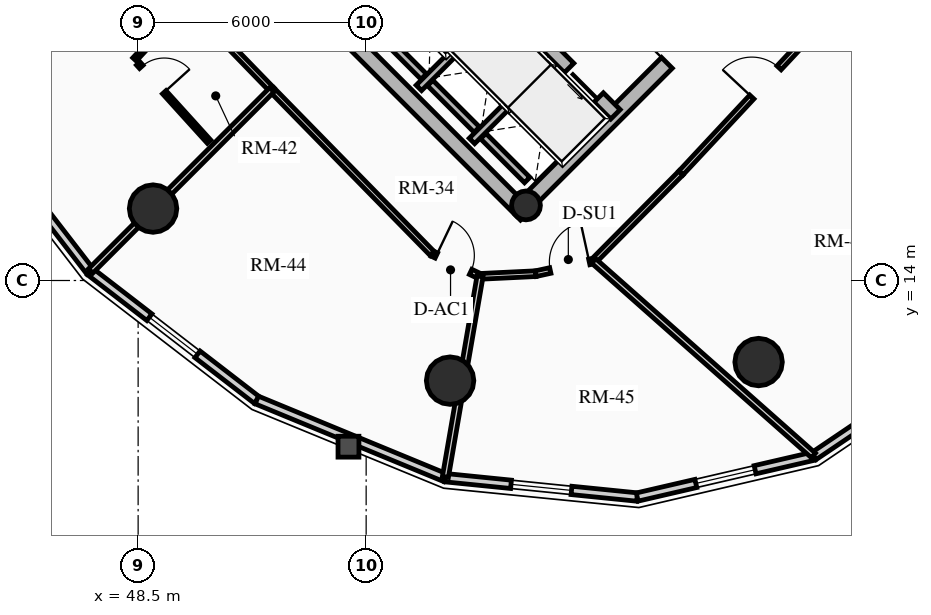
"""IFC4 building model, lengths in metres.
Left out: names, types, materials, properties, quantities, classifications, styles, units other than length and angle.
Written with IfcOpenShell. Run it as: python <this file> out.ifc"""

import sys

from ifc_helpers import new_model, si_unit, direction, frame, frame_2d, origin, origin_2d, place, context, subcontext, project, spatial, rectangle, circle, hollow_circle, extrude, source, transform, mapped, element, fill, save


model = new_model("IFC4")
c1 = context("Model", 3, precision=1e-05, world=origin(), true_north=direction((0.0, 1.0)))
c2 = subcontext(c1, "Body", "Model", "MODEL_VIEW")
j1 = project(units=[si_unit("LENGTHUNIT", "METRE"), si_unit("PLANEANGLEUNIT", "RADIAN")], contexts=[c1])
p1 = place(None, origin())
s1 = spatial("IfcSite", under=j1, at=p1, CompositionType="ELEMENT")
p2 = place(p1, origin())
s2 = spatial("IfcBuilding", under=s1, at=p2, CompositionType="ELEMENT")
p3 = place(p2, frame((0.0, 0.0, 154.51)))
s3 = spatial("IfcBuildingStorey", under=s2, at=p3, CompositionType="ELEMENT", Elevation=154.51)
p4 = place(p3, frame((58.702, 15.732, 0.0), z_axis=(0.0, 0.0, 1.0), x_axis=(-0.707106781187, 0.707106781187, 0.0)))
e1 = element("IfcWall", 1, at=p4, inside=s3, PredefinedType="SHEAR", context=c2, shape_type="SweptSolid", body=[
    extrude(rectangle(XDim=14.1, YDim=0.4, at=frame_2d((7.05, 0.0))), origin(), (0.0, 0.0, 1.0), 2.91),
])
p5 = place(p3, frame((58.561, 15.873, 0.0), z_axis=(0.0, 0.0, 1.0), x_axis=(0.707106781187, 0.707106781187, 0.0)))
e2 = element("IfcWall", 2, at=p5, inside=s3, PredefinedType="SHEAR", context=c2, shape_type="SweptSolid", body=[
    extrude(rectangle(XDim=10.7, YDim=0.4, at=frame_2d((5.35, 0.0))), origin(), (0.0, 0.0, 1.0), 2.91),
])
m1 = source(origin(), c2, "Body", "SweptSolid", [
    extrude(rectangle(XDim=1.5, YDim=2.02, at=frame_2d((0.75, 1.01))), frame((0.0, 0.21, 0.0), z_axis=(0.0, -1.0, 0.0), x_axis=(1.0, 0.0, 0.0)), (0.0, 0.0, 1.0), 0.42),
])
p6 = place(p5, frame((5.45, 0.0, 0.0)))
e3 = element("IfcOpeningElement", 3, at=p6, cuts=e2, PredefinedType="OPENING", context=c2, shape_type="MappedRepresentation", body=[
    mapped(m1, transform((0.0, 0.0, 0.0), x_axis=(1.0, 0.0, 0.0), y_axis=(0.0, 1.0, 0.0), z_axis=(0.0, 0.0, 1.0), scale=1.0)),
])
p7 = place(p3, frame((61.06, 18.373, 0.0), z_axis=(0.0, 0.0, 1.0), x_axis=(-0.707106781187, 0.707106781187, 0.0)))
e4 = element("IfcWall", 4, at=p7, inside=s3, PredefinedType="SHEAR", context=c2, shape_type="SweptSolid", body=[
    extrude(rectangle(XDim=13.7, YDim=0.35, at=frame_2d((6.85, 0.0))), origin(), (0.0, 0.0, 1.0), 2.91),
])
m2 = source(origin(), c2, "Body", "SweptSolid", [
    extrude(rectangle(XDim=1.1, YDim=2.015, at=frame_2d((0.55, 1.007))), frame((0.0, 0.185, 0.0), z_axis=(0.0, -1.0, 0.0), x_axis=(1.0, 0.0, 0.0)), (0.0, 0.0, 1.0), 0.37),
])
p8 = place(p7, frame((4.85, 0.0, 0.0)))
e5 = element("IfcOpeningElement", 5, at=p8, cuts=e4, PredefinedType="OPENING", context=c2, shape_type="MappedRepresentation", body=[
    mapped(m2, transform((0.0, 0.0, 0.0), x_axis=(1.0, 0.0, 0.0), y_axis=(0.0, 1.0, 0.0), z_axis=(0.0, 0.0, 1.0), scale=1.0)),
])
p9 = place(p7, frame((0.625, 0.0, 0.0)))
e6 = element("IfcOpeningElement", 6, at=p9, cuts=e4, PredefinedType="OPENING", context=c2, shape_type="MappedRepresentation", body=[
    mapped(m2, transform((0.0, 0.0, 0.0), x_axis=(1.0, 0.0, 0.0), y_axis=(0.0, 1.0, 0.0), z_axis=(0.0, 0.0, 1.0), scale=1.0)),
])
p10 = place(p7, frame((2.625, 0.0, 0.0)))
e7 = element("IfcOpeningElement", 7, at=p10, cuts=e4, PredefinedType="OPENING", context=c2, shape_type="MappedRepresentation", body=[
    mapped(m2, transform((0.0, 0.0, 0.0), x_axis=(1.0, 0.0, 0.0), y_axis=(0.0, 1.0, 0.0), z_axis=(0.0, 0.0, 1.0), scale=1.0)),
])
m3 = source(origin(), c2, "Body", "SweptSolid", [
    extrude(rectangle(XDim=1.15, YDim=2.02, at=frame_2d((0.575, 1.01))), frame((0.0, 0.185, 0.0), z_axis=(0.0, -1.0, 0.0), x_axis=(1.0, 0.0, 0.0)), (0.0, 0.0, 1.0), 0.37),
])
p11 = place(p7, frame((7.27, 0.0, 0.0)))
e8 = element("IfcOpeningElement", 8, at=p11, cuts=e4, PredefinedType="OPENING", context=c2, shape_type="MappedRepresentation", body=[
    mapped(m3, transform((0.0, 0.0, 0.0), x_axis=(1.0, 0.0, 0.0), y_axis=(0.0, 1.0, 0.0), z_axis=(0.0, 0.0, 1.0), scale=1.0)),
])
p12 = place(p3, frame((58.706, 15.976, 0.0), z_axis=(0.0, 0.0, 1.0), x_axis=(0.707106781187, 0.707106781187, 0.0)))
e9 = element("IfcColumn", 9, at=p12, inside=s3, PredefinedType="COLUMN", context=c2, shape_type="SweptSolid", body=[
    extrude(hollow_circle(Radius=0.38, WallThickness=0.032, at=origin_2d()), origin(), (0.0, 0.0, 1.0), 2.91),
])
for number, where, z_axis, x_axis in (
    (10, (48.893, 15.893, 0.0), (0.0, 0.0, 1.0), (1.0, 0.0, 0.0)),
    (11, (56.709, 11.365, 0.0), (0.0, 0.0, 1.0), (1.0, 0.0, 0.0)),
    (12, (64.827, 11.854, 0.0), (0.0, 0.0, 1.0), (1.0, 0.0, 0.0)),
):
    element("IfcColumn", number, at=place(p3, frame(where, z_axis=z_axis, x_axis=x_axis)), inside=s3, PredefinedType="USERDEFINED", context=c2, shape_type="SweptSolid", body=[
        extrude(circle(Radius=0.625, at=origin_2d()), origin(), (0.0, 0.0, 1.0), 2.91),
    ])
p13 = place(p3, frame((47.236, 14.236, 0.0), z_axis=(0.0, 0.0, 1.0), x_axis=(-0.610543584779, 0.791982658323, 0.0)))
e13 = element("IfcWall", 13, at=p13, inside=s3, PredefinedType="SOLIDWALL", context=c2, shape_type="SweptSolid", body=[
    extrude(rectangle(XDim=5.537, YDim=0.22, at=frame_2d((2.769, 0.0))), origin(), (0.0, 0.0, 1.0), 2.245),
])
p14 = place(p3, frame((51.622, 10.856, 0.0), z_axis=(0.0, 0.0, 1.0), x_axis=(-0.791982658323, 0.610543584779, 0.0)))
e14 = element("IfcWall", 14, at=p14, inside=s3, PredefinedType="SOLIDWALL", context=c2, shape_type="SweptSolid", body=[
    extrude(rectangle(XDim=5.537, YDim=0.22, at=frame_2d((2.769, 0.0))), origin(), (0.0, 0.0, 1.0), 2.245),
])
m4 = source(origin(), c2, "Body", "SweptSolid", [
    extrude(rectangle(XDim=1.6, YDim=1.3, at=frame_2d((0.8, 0.65))), frame((0.0, 0.12, 0.0), z_axis=(0.0, -1.0, 0.0), x_axis=(1.0, 0.0, 0.0)), (0.0, 0.0, 1.0), 0.24),
])
p15 = place(p14, frame((1.968, 0.0, 0.65)))
e15 = element("IfcOpeningElement", 15, at=p15, cuts=e14, PredefinedType="OPENING", context=c2, shape_type="MappedRepresentation", body=[
    mapped(m4, transform((0.0, 0.0, 0.0), x_axis=(1.0, 0.0, 0.0), y_axis=(0.0, 1.0, 0.0), z_axis=(0.0, 0.0, 1.0), scale=1.0)),
])
p16 = place(p3, frame((56.582, 8.811, 0.0), z_axis=(0.0, 0.0, 1.0), x_axis=(-0.924528197738, 0.38111364655, 0.0)))
e16 = element("IfcWall", 16, at=p16, inside=s3, PredefinedType="SOLIDWALL", context=c2, shape_type="SweptSolid", body=[
    extrude(rectangle(XDim=5.366, YDim=0.22, at=frame_2d((2.683, 0.0))), origin(), (0.0, 0.0, 1.0), 2.245),
])
p17 = place(p3, frame((61.633, 8.302, 0.0), z_axis=(0.0, 0.0, 1.0), x_axis=(-0.994959267396, 0.100279889424, 0.0)))
e17 = element("IfcWall", 17, at=p17, inside=s3, PredefinedType="SOLIDWALL", context=c2, shape_type="SweptSolid", body=[
    extrude(rectangle(XDim=5.076, YDim=0.22, at=frame_2d((2.538, 0.0))), origin(), (0.0, 0.0, 1.0), 2.245),
])
p18 = place(p17, frame((1.738, 0.0, 0.65)))
e18 = element("IfcOpeningElement", 18, at=p18, cuts=e17, PredefinedType="OPENING", context=c2, shape_type="MappedRepresentation", body=[
    mapped(m4, transform((0.0, 0.0, 0.0), x_axis=(1.0, 0.0, 0.0), y_axis=(0.0, 1.0, 0.0), z_axis=(0.0, 0.0, 1.0), scale=1.0)),
])
p19 = place(p3, frame((66.279, 9.378, 0.0), z_axis=(0.0, 0.0, 1.0), x_axis=(-0.974206226622, -0.225659540039, 0.0)))
e19 = element("IfcWall", 19, at=p19, inside=s3, PredefinedType="SOLIDWALL", context=c2, shape_type="SweptSolid", body=[
    extrude(rectangle(XDim=4.769, YDim=0.22, at=frame_2d((2.385, 0.0))), origin(), (0.0, 0.0, 1.0), 2.245),
])
p20 = place(p19, frame((1.585, 0.0, 0.65)))
e20 = element("IfcOpeningElement", 20, at=p20, cuts=e19, PredefinedType="OPENING", context=c2, shape_type="MappedRepresentation", body=[
    mapped(m4, transform((0.0, 0.0, 0.0), x_axis=(1.0, 0.0, 0.0), y_axis=(0.0, 1.0, 0.0), z_axis=(0.0, 0.0, 1.0), scale=1.0)),
])
p21 = place(p3, frame((70.065, 11.935, 0.0), z_axis=(0.0, 0.0, 1.0), x_axis=(-0.828739009952, -0.559635286042, 0.0)))
e21 = element("IfcWall", 21, at=p21, inside=s3, PredefinedType="SOLIDWALL", context=c2, shape_type="SweptSolid", body=[
    extrude(rectangle(XDim=4.569, YDim=0.22, at=frame_2d((2.284, 0.0))), origin(), (0.0, 0.0, 1.0), 2.245),
])
p22 = place(p3, frame((55.888, 19.069, 0.0), z_axis=(0.0, 0.0, 1.0), x_axis=(0.707106781187, 0.707106781187, 0.0)))
e22 = element("IfcWall", 22, at=p22, inside=s3, PredefinedType="SHEAR", context=c2, shape_type="SweptSolid", body=[
    extrude(rectangle(XDim=2.97, YDim=0.2, at=frame_2d((1.485, 0.0))), origin(), (0.0, 0.0, 1.0), 2.91),
])
p23 = place(p3, frame((56.015, 19.366, 0.0), z_axis=(0.0, 0.0, 1.0), x_axis=(-0.707106781187, 0.707106781187, 0.0)))
e23 = element("IfcWall", 23, at=p23, inside=s3, PredefinedType="SHEAR", context=c2, shape_type="SweptSolid", body=[
    extrude(rectangle(XDim=2.44, YDim=0.2, at=frame_2d((1.22, 0.0))), origin(), (0.0, 0.0, 1.0), 2.91),
])
p24 = place(p3, frame((57.284, 17.673, 0.0), z_axis=(0.0, 0.0, 1.0), x_axis=(0.707147878904, 0.70706568108, 0.0)))
e24 = element("IfcWall", 24, at=p24, inside=s3, PredefinedType="SHEAR", context=c2, shape_type="SweptSolid", body=[
    extrude(rectangle(XDim=2.97, YDim=0.2, at=frame_2d((1.485, 0.0))), origin(), (0.0, 0.0, 1.0), 2.91),
])
p25 = place(p3, frame((57.412, 17.97, 0.0), z_axis=(0.0, 0.0, 1.0), x_axis=(-0.707106781187, 0.707106781187, 0.0)))
e25 = element("IfcWall", 25, at=p25, inside=s3, PredefinedType="SHEAR", context=c2, shape_type="SweptSolid", body=[
    extrude(rectangle(XDim=1.735, YDim=0.2, at=frame_2d((0.867, 0.0))), origin(), (0.0, 0.0, 1.0), 2.91),
])
p26 = place(p3, frame((58.737, 16.644, 0.0), z_axis=(0.0, 0.0, 1.0), x_axis=(-0.707032117043, 0.707181437447, 0.0)))
e26 = element("IfcWall", 26, at=p26, inside=s3, PredefinedType="SHEAR", context=c2, shape_type="SweptSolid", body=[
    extrude(rectangle(XDim=1.635, YDim=0.2, at=frame_2d((0.817, 0.0))), origin(), (0.0, 0.0, 1.0), 2.91),
])
p27 = place(p3, frame((47.901, 23.265, 0.0), z_axis=(0.0, 0.0, 1.0), x_axis=(0.696355965374, -0.717696572019, 0.0)))
e27 = element("IfcWall", 27, at=p27, inside=s3, PredefinedType="PARTITIONING", context=c2, shape_type="SweptSolid", body=[
    extrude(rectangle(XDim=5.915, YDim=0.15, at=frame_2d((2.957, 0.0))), origin(), (0.0, 0.0, 1.0), 2.675),
])
p28 = place(p3, frame((52.02, 19.02, 0.0), z_axis=(0.0, 0.0, 1.0), x_axis=(0.699456449804, -0.71467522332, 0.0)))
e28 = element("IfcWall", 28, at=p28, inside=s3, PredefinedType="PARTITIONING", context=c2, shape_type="SweptSolid", body=[
    extrude(rectangle(XDim=6.032, YDim=0.15, at=frame_2d((3.016, 0.0))), origin(), (0.0, 0.0, 1.0), 2.245),
])
p29 = place(p3, frame((56.239, 14.709, 0.0), z_axis=(0.0, 0.0, 1.0), x_axis=(0.902374219125, -0.430953325383, 0.0)))
e29 = element("IfcWall", 29, at=p29, inside=s3, PredefinedType="PARTITIONING", context=c2, shape_type="SweptSolid", body=[
    extrude(rectangle(XDim=1.394, YDim=0.15, at=frame_2d((0.697, 0.0))), origin(), (0.0, 0.0, 1.0), 2.245),
])
m5 = source(origin(), c2, "Body", "SweptSolid", [
    extrude(rectangle(XDim=1.0, YDim=2.015, at=frame_2d((0.5, 1.007))), frame((0.0, 0.085, 0.0), z_axis=(0.0, -1.0, 0.0), x_axis=(1.0, 0.0, 0.0)), (0.0, 0.0, 1.0), 0.17),
])
p30 = place(p29, frame((0.12, 0.0, 0.0)))
e30 = element("IfcOpeningElement", 30, at=p30, cuts=e29, PredefinedType="OPENING", context=c2, shape_type="MappedRepresentation", body=[
    mapped(m5, transform((0.0, 0.0, 0.0), x_axis=(1.0, 0.0, 0.0), y_axis=(0.0, 1.0, 0.0), z_axis=(0.0, 0.0, 1.0), scale=1.0)),
])
p31 = place(p3, frame((57.497, 14.109, 0.0), z_axis=(0.0, 0.0, 1.0), x_axis=(0.998828286318, 0.048394777109, 0.0)))
e31 = element("IfcWall", 31, at=p31, inside=s3, PredefinedType="PARTITIONING", context=c2, shape_type="SweptSolid", body=[
    extrude(rectangle(XDim=1.468, YDim=0.15, at=frame_2d((0.734, 0.0))), origin(), (0.0, 0.0, 1.0), 2.245),
])
p32 = place(p3, frame((58.963, 14.18, 0.0), z_axis=(0.0, 0.0, 1.0), x_axis=(0.976826524015, 0.214032572243, 0.0)))
e32 = element("IfcWall", 32, at=p32, inside=s3, PredefinedType="PARTITIONING", context=c2, shape_type="SweptSolid", body=[
    extrude(rectangle(XDim=1.562, YDim=0.15, at=frame_2d((0.781, 0.0))), origin(), (0.0, 0.0, 1.0), 2.245),
])
m6 = source(origin(), c2, "Body", "SweptSolid", [
    extrude(rectangle(XDim=1.05, YDim=2.015, at=frame_2d((0.525, 1.007))), frame((0.0, 0.085, 0.0), z_axis=(0.0, -1.0, 0.0), x_axis=(1.0, 0.0, 0.0)), (0.0, 0.0, 1.0), 0.17),
])
p33 = place(p32, frame((0.392, 0.0, 0.0)))
e33 = element("IfcOpeningElement", 33, at=p33, cuts=e32, PredefinedType="OPENING", context=c2, shape_type="MappedRepresentation", body=[
    mapped(m6, transform((0.0, 0.0, 0.0), x_axis=(1.0, 0.0, 0.0), y_axis=(0.0, 1.0, 0.0), z_axis=(0.0, 0.0, 1.0), scale=1.0)),
])
p34 = place(p3, frame((60.488, 14.514, 0.0), z_axis=(0.0, 0.0, 1.0), x_axis=(0.703880260405, 0.71031864611, 0.0)))
e34 = element("IfcWall", 34, at=p34, inside=s3, PredefinedType="PARTITIONING", context=c2, shape_type="SweptSolid", body=[
    extrude(rectangle(XDim=3.261, YDim=0.15, at=frame_2d((1.63, 0.0))), origin(), (0.0, 0.0, 1.0), 2.245),
])
p35 = place(p3, frame((62.784, 16.83, 0.0), z_axis=(0.0, 0.0, 1.0), x_axis=(0.682240832942, 0.731127516831, 0.0)))
e35 = element("IfcWall", 35, at=p35, inside=s3, PredefinedType="PARTITIONING", context=c2, shape_type="SweptSolid", body=[
    extrude(rectangle(XDim=6.517, YDim=0.15, at=frame_2d((3.259, 0.0))), origin(), (0.0, 0.0, 1.0), 2.245),
])
p36 = place(p35, frame((2.734, 0.0, 0.0)))
e36 = element("IfcOpeningElement", 36, at=p36, cuts=e35, PredefinedType="OPENING", context=c2, shape_type="MappedRepresentation", body=[
    mapped(m6, transform((0.0, 0.0, 0.0), x_axis=(1.0, 0.0, 0.0), y_axis=(0.0, 1.0, 0.0), z_axis=(0.0, 0.0, 1.0), scale=1.0)),
])
p37 = place(p3, frame((52.02, 19.02, 0.0), z_axis=(0.0, 0.0, 1.0), x_axis=(-0.707106781187, -0.707106781187, 0.0)))
e37 = element("IfcWall", 37, at=p37, inside=s3, PredefinedType="PARTITIONING", context=c2, shape_type="SweptSolid", body=[
    extrude(rectangle(XDim=6.745, YDim=0.16, at=frame_2d((3.373, 0.0))), origin(), (0.0, 0.0, 1.0), 2.245),
])
p38 = place(p3, frame((57.497, 14.109, 0.0), z_axis=(0.0, 0.0, 1.0), x_axis=(-0.170109923992, -0.985425092922, 0.0)))
e38 = element("IfcWall", 38, at=p38, inside=s3, PredefinedType="PARTITIONING", context=c2, shape_type="SweptSolid", body=[
    extrude(rectangle(XDim=5.356, YDim=0.16, at=frame_2d((2.678, 0.0))), origin(), (0.0, 0.0, 1.0), 2.245),
])
p39 = place(p3, frame((60.488, 14.514, 0.0), z_axis=(0.0, 0.0, 1.0), x_axis=(0.748740614849, -0.662863101761, 0.0)))
e39 = element("IfcWall", 39, at=p39, inside=s3, PredefinedType="PARTITIONING", context=c2, shape_type="SweptSolid", body=[
    extrude(rectangle(XDim=7.721, YDim=0.16, at=frame_2d((3.861, 0.0))), origin(), (0.0, 0.0, 1.0), 2.245),
])
p40 = place(p3, frame((67.23, 21.595, 0.0), z_axis=(0.0, 0.0, 1.0), x_axis=(0.67560509773, -0.737263692258, 0.0)))
e40 = element("IfcWall", 40, at=p40, inside=s3, PredefinedType="PARTITIONING", context=c2, shape_type="SweptSolid", body=[
    extrude(rectangle(XDim=7.955, YDim=0.16, at=frame_2d((3.978, 0.0))), origin(), (0.0, 0.0, 1.0), 2.245),
])
p41 = place(p3, frame((49.665, 21.171, 0.0), z_axis=(0.0, 0.0, 1.0), x_axis=(-0.681089123144, -0.73220052331, 0.0)))
e41 = element("IfcWall", 41, at=p41, inside=s3, PredefinedType="PARTITIONING", context=c2, shape_type="SweptSolid", body=[
    extrude(rectangle(XDim=1.849, YDim=0.125, at=frame_2d((0.924, 0.0))), origin(), (0.0, 0.0, 1.0), 2.675),
])
p42 = place(p3, frame((48.503, 19.711, 0.0), z_axis=(0.0, 0.0, 1.0), x_axis=(0.671201050003, -0.741275354018, 0.0)))
e42 = element("IfcWall", 42, at=p42, inside=s3, PredefinedType="PARTITIONING", context=c2, shape_type="SweptSolid", body=[
    extrude(rectangle(XDim=2.777, YDim=0.125, at=frame_2d((1.388, 0.0))), origin(), (0.0, 0.0, 1.0), 2.675),
])
m7 = source(origin(), c2, "Body", "SweptSolid", [
    extrude(rectangle(XDim=0.9, YDim=2.005, at=frame_2d((0.45, 1.002))), frame((0.0, 0.073, 0.0), z_axis=(0.0, -1.0, 0.0), x_axis=(1.0, 0.0, 0.0)), (0.0, 0.0, 1.0), 0.145),
])
p43 = place(p42, frame((0.12, 0.0, 0.0)))
e43 = element("IfcOpeningElement", 43, at=p43, cuts=e42, PredefinedType="OPENING", context=c2, shape_type="MappedRepresentation", body=[
    mapped(m7, transform((0.0, 0.0, 0.0), x_axis=(1.0, 0.0, 0.0), y_axis=(0.0, 1.0, 0.0), z_axis=(0.0, 0.0, 1.0), scale=1.0)),
])
m8 = source(origin(), c2, "Body", "SweptSolid", [
    extrude(rectangle(XDim=1.6, YDim=1.3, at=frame_2d((0.8, 0.65))), frame((0.0, 0.03, 0.0), z_axis=(0.0, -1.0, 0.0), x_axis=(1.0, 0.0, 0.0)), (0.0, 0.0, 1.0), 0.06),
])
p44 = place(p15, origin())
e44 = element("IfcWindow", 44, at=p44, inside=s3, PartitioningType="SINGLE_PANEL", PredefinedType="WINDOW", context=c2, shape_type="MappedRepresentation", body=[
    mapped(m8, transform((0.0, 0.0, 0.0), x_axis=(1.0, 0.0, 0.0), y_axis=(0.0, 1.0, 0.0), z_axis=(0.0, 0.0, 1.0), scale=1.0)),
])
fill(e15, e44)
p45 = place(p18, origin())
e45 = element("IfcWindow", 45, at=p45, inside=s3, PartitioningType="SINGLE_PANEL", PredefinedType="WINDOW", context=c2, shape_type="MappedRepresentation", body=[
    mapped(m8, transform((0.0, 0.0, 0.0), x_axis=(1.0, 0.0, 0.0), y_axis=(0.0, 1.0, 0.0), z_axis=(0.0, 0.0, 1.0), scale=1.0)),
])
fill(e18, e45)
p46 = place(p20, origin())
e46 = element("IfcWindow", 46, at=p46, inside=s3, PartitioningType="SINGLE_PANEL", PredefinedType="WINDOW", context=c2, shape_type="MappedRepresentation", body=[
    mapped(m8, transform((0.0, 0.0, 0.0), x_axis=(1.0, 0.0, 0.0), y_axis=(0.0, 1.0, 0.0), z_axis=(0.0, 0.0, 1.0), scale=1.0)),
])
fill(e20, e46)
m9 = source(origin(), c2, "Body", "SweptSolid", [
    extrude(rectangle(XDim=1.1, YDim=2.015, at=frame_2d((0.55, 1.007))), frame((0.0, 0.025, 0.0), z_axis=(0.0, -1.0, 0.0), x_axis=(1.0, 0.0, 0.0)), (0.0, 0.0, 1.0), 0.05),
])
p47 = place(p9, origin())
e47 = element("IfcDoor", 47, at=p47, inside=s3, OperationType="SLIDING_TO_LEFT", PredefinedType="DOOR", context=c2, shape_type="MappedRepresentation", body=[
    mapped(m9, transform((0.0, 0.0, 0.0), x_axis=(1.0, 0.0, 0.0), y_axis=(0.0, 1.0, 0.0), z_axis=(0.0, 0.0, 1.0), scale=1.0)),
])
fill(e6, e47)
m10 = source(origin(), c2, "Body", "SweptSolid", [
    extrude(rectangle(XDim=1.5, YDim=2.02, at=frame_2d((0.75, 1.01))), frame((0.0, 0.025, 0.0), z_axis=(0.0, -1.0, 0.0), x_axis=(1.0, 0.0, 0.0)), (0.0, 0.0, 1.0), 0.05),
])
p48 = place(p6, origin())
e48 = element("IfcDoor", 48, at=p48, inside=s3, OperationType="DOUBLE_DOOR_SINGLE_SWING", PredefinedType="DOOR", context=c2, shape_type="MappedRepresentation", body=[
    mapped(m10, transform((0.0, 0.0, 0.0), x_axis=(1.0, 0.0, 0.0), y_axis=(0.0, 1.0, 0.0), z_axis=(0.0, 0.0, 1.0), scale=1.0)),
])
fill(e3, e48)
m11 = source(origin(), c2, "Body", "SweptSolid", [
    extrude(rectangle(XDim=0.9, YDim=2.005, at=frame_2d((0.45, 1.002))), frame((0.0, 0.025, 0.0), z_axis=(0.0, -1.0, 0.0), x_axis=(1.0, 0.0, 0.0)), (0.0, 0.0, 1.0), 0.05),
])
p49 = place(p43, origin())
e49 = element("IfcDoor", 49, at=p49, inside=s3, OperationType="SINGLE_SWING_RIGHT", PredefinedType="DOOR", context=c2, shape_type="MappedRepresentation", body=[
    mapped(m11, transform((0.0, 0.0, 0.0), x_axis=(1.0, 0.0, 0.0), y_axis=(0.0, 1.0, 0.0), z_axis=(0.0, 0.0, 1.0), scale=1.0)),
])
fill(e43, e49)
m12 = source(origin(), c2, "Body", "SweptSolid", [
    extrude(rectangle(XDim=1.0, YDim=2.015, at=frame_2d((0.5, 1.007))), frame((0.0, 0.025, 0.0), z_axis=(0.0, -1.0, 0.0), x_axis=(1.0, 0.0, 0.0)), (0.0, 0.0, 1.0), 0.05),
])
p50 = place(p30, origin())
e50 = element("IfcDoor", 50, at=p50, inside=s3, OperationType="SINGLE_SWING_LEFT", PredefinedType="DOOR", context=c2, shape_type="MappedRepresentation", body=[
    mapped(m12, transform((0.0, 0.0, 0.0), x_axis=(1.0, 0.0, 0.0), y_axis=(0.0, 1.0, 0.0), z_axis=(0.0, 0.0, 1.0), scale=1.0)),
])
fill(e30, e50)
m13 = source(origin(), c2, "Body", "SweptSolid", [
    extrude(rectangle(XDim=1.05, YDim=2.015, at=frame_2d((0.525, 1.007))), frame((0.0, 0.025, 0.0), z_axis=(0.0, -1.0, 0.0), x_axis=(1.0, 0.0, 0.0)), (0.0, 0.0, 1.0), 0.05),
])
p51 = place(p33, origin())
e51 = element("IfcDoor", 51, at=p51, inside=s3, OperationType="SINGLE_SWING_RIGHT", PredefinedType="DOOR", context=c2, shape_type="MappedRepresentation", body=[
    mapped(m13, transform((0.0, 0.0, 0.0), x_axis=(1.0, 0.0, 0.0), y_axis=(0.0, 1.0, 0.0), z_axis=(0.0, 0.0, 1.0), scale=1.0)),
])
fill(e33, e51)
p52 = place(p36, origin())
e52 = element("IfcDoor", 52, at=p52, inside=s3, OperationType="SINGLE_SWING_LEFT", PredefinedType="DOOR", context=c2, shape_type="MappedRepresentation", body=[
    mapped(m13, transform((0.0, 0.0, 0.0), x_axis=(1.0, 0.0, 0.0), y_axis=(0.0, 1.0, 0.0), z_axis=(0.0, 0.0, 1.0), scale=1.0)),
])
fill(e36, e52)
save(model, sys.argv[1])
